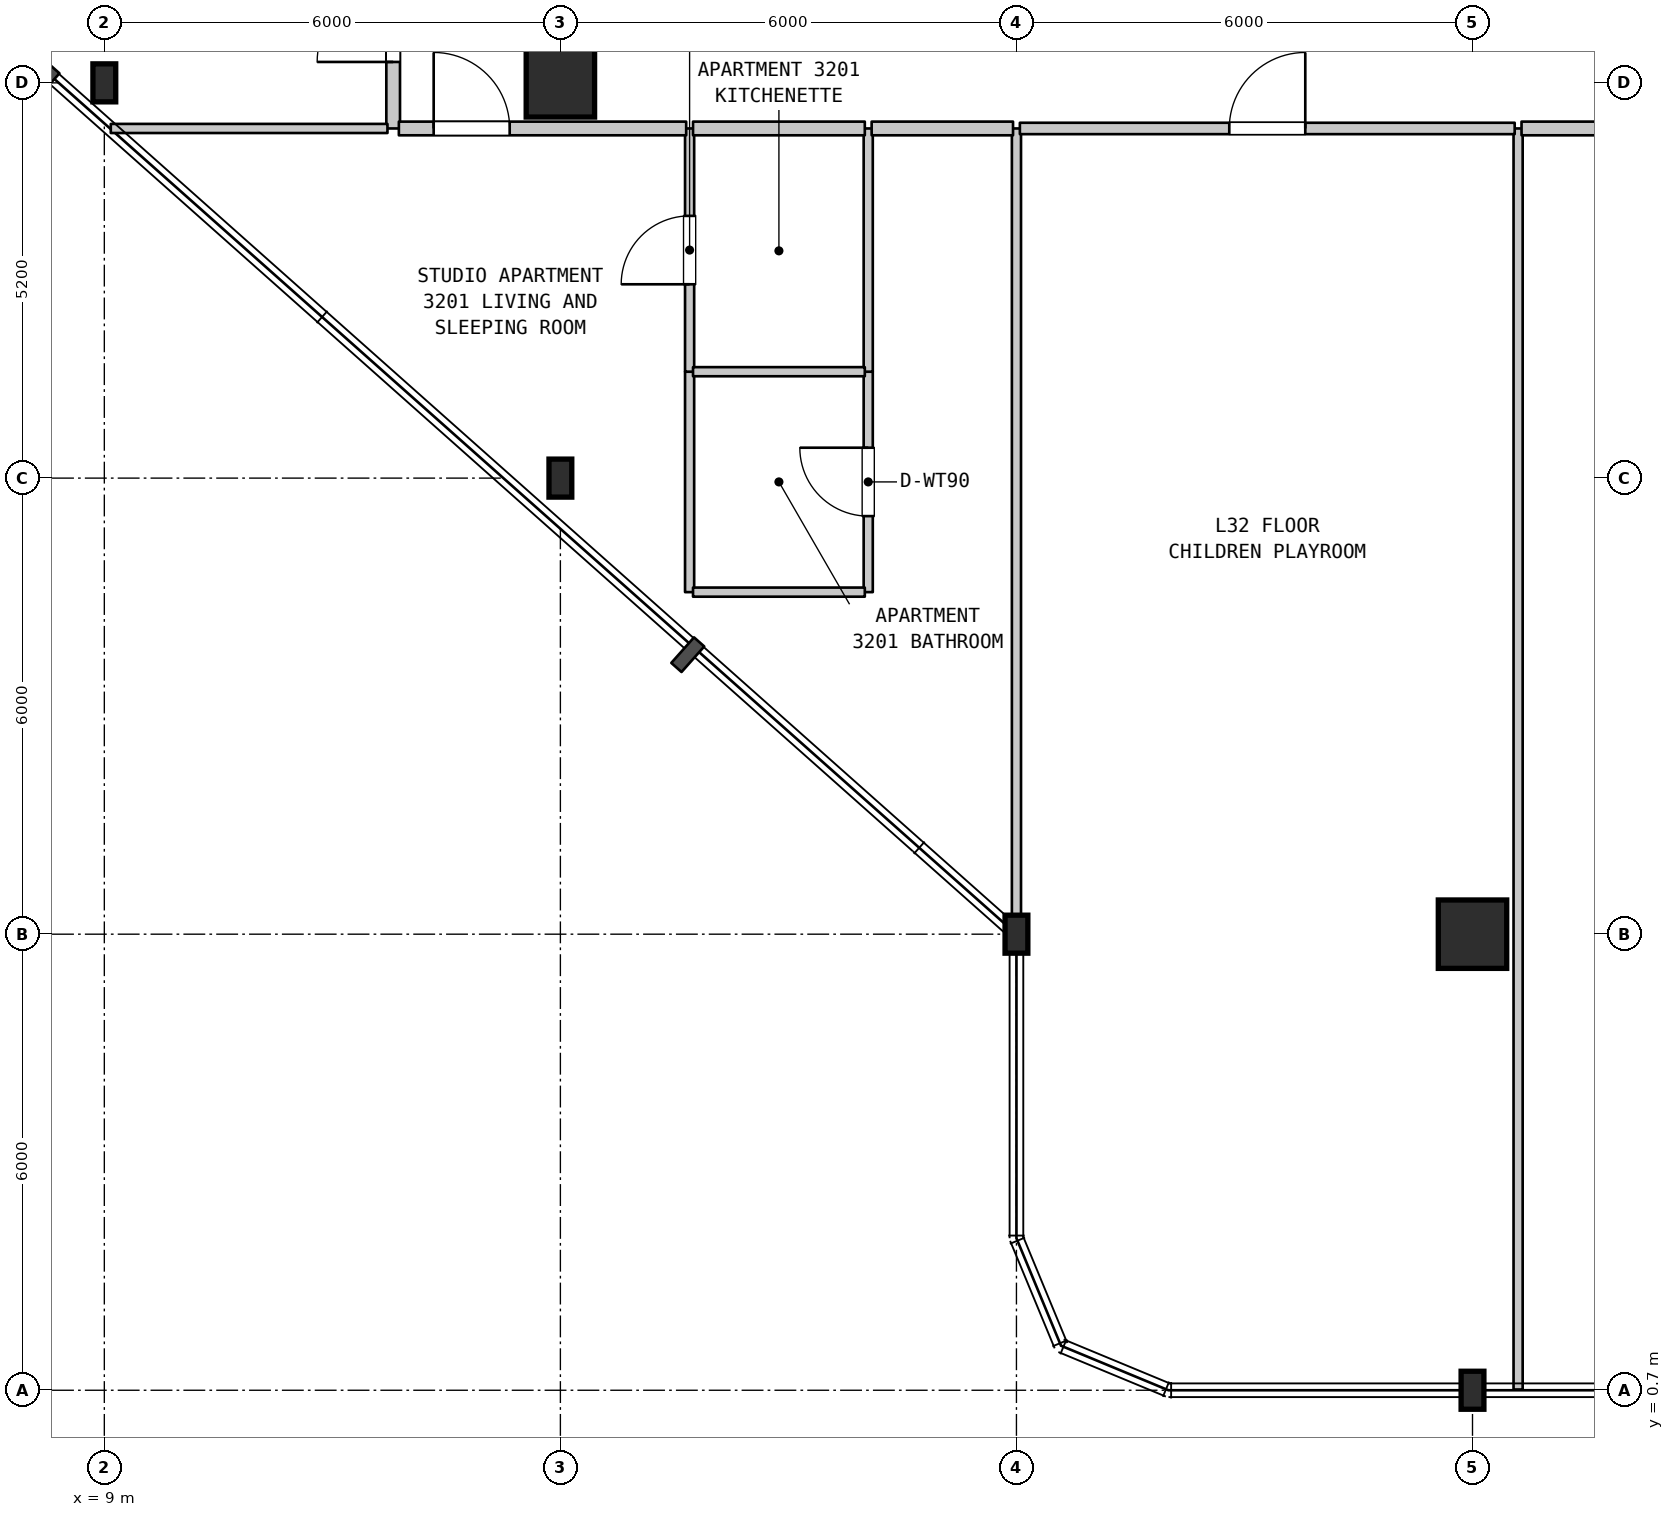
"""IFC4 building model, lengths in metres.
Left out: names, types, materials, properties, quantities, classifications, styles, units other than length and angle.
Written with IfcOpenShell. Run it as: python <this file> out.ifc"""

import sys

from ifc_helpers import new_model, si_unit, direction, frame, frame_2d, origin, origin_2d, place, context, subcontext, project, spatial, rectangle, i_section, extrude, element, fill, save


model = new_model("IFC4")
c1 = context("Model", 3, precision=1e-05, world=origin(), true_north=direction((0.0, 1.0)))
c2 = subcontext(c1, "Body", "Model", "MODEL_VIEW")
j1 = project(units=[si_unit("LENGTHUNIT", "METRE"), si_unit("PLANEANGLEUNIT", "RADIAN")], contexts=[c1])
p1 = place(None, origin())
s1 = spatial("IfcSite", under=j1, at=p1, CompositionType="ELEMENT")
p2 = place(p1, origin())
s2 = spatial("IfcBuilding", under=s1, at=p2, CompositionType="ELEMENT")
p3 = place(p2, frame((0.0, 0.0, 133.5)))
s3 = spatial("IfcBuildingStorey", under=s2, at=p3, CompositionType="ELEMENT", Elevation=133.5)
for number, where, z_axis, x_axis in (
    (1, (9.0, 17.9, 0.0), (0.0, 0.0, 1.0), (1.0, 0.0, 0.0)),
    (2, (15.0, 12.7, 0.0), (0.0, 0.0, 1.0), (1.0, 0.0, 0.0)),
):
    element("IfcColumn", number, at=place(p3, frame(where, z_axis=z_axis, x_axis=x_axis)), inside=s3, PredefinedType="COLUMN", context=c2, shape_type="SweptSolid", body=[
        extrude(i_section(OverallWidth=0.3, OverallDepth=0.5, WebThickness=0.014, FlangeThickness=0.028, FilletRadius=0.027, at=origin_2d()), origin(), (0.0, 0.0, 1.0), 3.7),
    ])
p4 = place(p3, frame((15.0, 17.9, 0.0), z_axis=(0.0, 0.0, 1.0), x_axis=(1.0, 0.0, 0.0)))
e3 = element("IfcColumn", 3, at=p4, inside=s3, PredefinedType="COLUMN", context=c2, shape_type="SweptSolid", body=[
    extrude(rectangle(XDim=0.9, YDim=0.9, at=origin_2d()), origin(), (0.0, 0.0, 1.0), 3.7),
])
for number, where, z_axis, x_axis in (
    (4, (21.0, 6.7, 0.0), (0.0, 0.0, 1.0), (1.0, 0.0, 0.0)),
    (5, (27.0, 0.7, 0.0), (0.0, 0.0, 1.0), (1.0, 0.0, 0.0)),
):
    element("IfcColumn", number, at=place(p3, frame(where, z_axis=z_axis, x_axis=x_axis)), inside=s3, PredefinedType="COLUMN", context=c2, shape_type="SweptSolid", body=[
        extrude(i_section(OverallWidth=0.3, OverallDepth=0.5, WebThickness=0.014, FlangeThickness=0.028, FilletRadius=0.027, at=origin_2d()), origin(), (0.0, 0.0, 1.0), 3.7),
    ])
p5 = place(p3, frame((27.0, 6.7, 0.0), z_axis=(0.0, 0.0, 1.0), x_axis=(1.0, 0.0, 0.0)))
e6 = element("IfcColumn", 6, at=p5, inside=s3, PredefinedType="COLUMN", context=c2, shape_type="SweptSolid", body=[
    extrude(rectangle(XDim=0.9, YDim=0.9, at=origin_2d()), origin(), (0.0, 0.0, 1.0), 3.7),
])
p6 = place(p3, frame((12.8, 17.3, 0.0), z_axis=(0.0, 0.0, 1.0), x_axis=(0.0, 1.0, 0.0)))
e7 = element("IfcWall", 7, at=p6, inside=s3, PredefinedType="STANDARD", context=c2, shape_type="SweptSolid", body=[
    extrude(rectangle(XDim=2.75, YDim=0.18, at=frame_2d((1.375, 0.0))), origin(), (0.0, 0.0, 1.0), 3.385),
])
p7 = place(p6, frame((0.875, 0.0, 0.0)))
e8 = element("IfcOpeningElement", 8, at=p7, cuts=e7, PredefinedType="OPENING", context=c2, shape_type="SweptSolid", body=[
    extrude(rectangle(XDim=1.0, YDim=2.15, at=frame_2d((0.5, 1.075))), frame((0.0, 0.1, 0.0), z_axis=(0.0, -1.0, 0.0), x_axis=(1.0, 0.0, 0.0)), (0.0, 0.0, 1.0), 0.2),
])
p8 = place(p3, frame((16.7, 11.2, 0.0), z_axis=(0.0, 0.0, 1.0), x_axis=(0.0, 1.0, 0.0)))
e9 = element("IfcWall", 9, at=p8, inside=s3, PredefinedType="PARTITIONING", context=c2, shape_type="SweptSolid", body=[
    extrude(rectangle(XDim=2.9, YDim=0.12, at=frame_2d((1.45, 0.0))), origin(), (0.0, 0.0, 1.0), 3.385),
])
p9 = place(p3, frame((16.7, 14.1, 0.0), z_axis=(0.0, 0.0, 1.0), x_axis=(0.0, 1.0, 0.0)))
e10 = element("IfcWall", 10, at=p9, inside=s3, PredefinedType="PARTITIONING", context=c2, shape_type="SweptSolid", body=[
    extrude(rectangle(XDim=3.2, YDim=0.12, at=frame_2d((1.6, 0.0))), origin(), (0.0, 0.0, 1.0), 3.385),
])
p10 = place(p9, frame((1.15, 0.0, 0.0)))
e11 = element("IfcOpeningElement", 11, at=p10, cuts=e10, PredefinedType="OPENING", context=c2, shape_type="SweptSolid", body=[
    extrude(rectangle(XDim=0.9, YDim=2.15, at=frame_2d((0.45, 1.075))), frame((0.0, 0.07, 0.0), z_axis=(0.0, -1.0, 0.0), x_axis=(1.0, 0.0, 0.0)), (0.0, 0.0, 1.0), 0.14),
])
p11 = place(p3, frame((19.05, 11.2, 0.0), z_axis=(0.0, 0.0, 1.0), x_axis=(0.0, 1.0, 0.0)))
e12 = element("IfcWall", 12, at=p11, inside=s3, PredefinedType="PARTITIONING", context=c2, shape_type="SweptSolid", body=[
    extrude(rectangle(XDim=2.9, YDim=0.12, at=frame_2d((1.45, 0.0))), origin(), (0.0, 0.0, 1.0), 3.385),
])
p12 = place(p11, frame((1.0, 0.0, 0.0)))
e13 = element("IfcOpeningElement", 13, at=p12, cuts=e12, PredefinedType="OPENING", context=c2, shape_type="SweptSolid", body=[
    extrude(rectangle(XDim=0.9, YDim=2.1, at=frame_2d((0.45, 1.05))), frame((0.0, 0.07, 0.0), z_axis=(0.0, -1.0, 0.0), x_axis=(1.0, 0.0, 0.0)), (0.0, 0.0, 1.0), 0.14),
])
p13 = place(p3, frame((19.05, 14.1, 0.0), z_axis=(0.0, 0.0, 1.0), x_axis=(0.0, 1.0, 0.0)))
e14 = element("IfcWall", 14, at=p13, inside=s3, PredefinedType="PARTITIONING", context=c2, shape_type="SweptSolid", body=[
    extrude(rectangle(XDim=3.2, YDim=0.12, at=frame_2d((1.6, 0.0))), origin(), (0.0, 0.0, 1.0), 3.385),
])
p14 = place(p3, frame((21.0, 6.71, 0.0), z_axis=(0.0, 0.0, 1.0), x_axis=(0.0, 1.0, 0.0)))
e15 = element("IfcWall", 15, at=p14, inside=s3, PredefinedType="PARTITIONING", context=c2, shape_type="SweptSolid", body=[
    extrude(rectangle(XDim=10.59, YDim=0.12, at=frame_2d((5.295, 0.0))), origin(), (0.0, 0.0, 1.0), 3.385),
])
p15 = place(p3, frame((27.6, 0.71, 0.0), z_axis=(0.0, 0.0, 1.0), x_axis=(0.0, 1.0, 0.0)))
e16 = element("IfcWall", 16, at=p15, inside=s3, PredefinedType="PARTITIONING", context=c2, shape_type="SweptSolid", body=[
    extrude(rectangle(XDim=16.59, YDim=0.12, at=frame_2d((8.295, 0.0))), origin(), (0.0, 0.0, 1.0), 3.385),
])
for number, where, z_axis, x_axis in (
    (17, (16.745, 11.2, 0.0), (0.0, 0.0, 1.0), (1.0, 0.0, 0.0)),
    (18, (16.745, 14.1, 0.0), (0.0, 0.0, 1.0), (1.0, 0.0, 0.0)),
):
    element("IfcWall", number, at=place(p3, frame(where, z_axis=z_axis, x_axis=x_axis)), inside=s3, PredefinedType="PARTITIONING", context=c2, shape_type="SweptSolid", body=[
        extrude(rectangle(XDim=2.26, YDim=0.12, at=frame_2d((1.13, 0.0))), origin(), (0.0, 0.0, 1.0), 3.385),
    ])
p16 = place(p3, frame((9.085, 17.3, 0.0), z_axis=(0.0, 0.0, 1.0), x_axis=(1.0, 0.0, 0.0)))
e19 = element("IfcWall", 19, at=p16, inside=s3, PredefinedType="PARTITIONING", context=c2, shape_type="SweptSolid", body=[
    extrude(rectangle(XDim=3.64, YDim=0.12, at=frame_2d((1.82, 0.0))), origin(), (0.0, 0.0, 1.0), 3.385),
])
p17 = place(p3, frame((12.875, 17.3, 0.0), z_axis=(0.0, 0.0, 1.0), x_axis=(1.0, 0.0, 0.0)))
e20 = element("IfcWall", 20, at=p17, inside=s3, PredefinedType="STANDARD", context=c2, shape_type="SweptSolid", body=[
    extrude(rectangle(XDim=3.78, YDim=0.18, at=frame_2d((1.89, 0.0))), origin(), (0.0, 0.0, 1.0), 3.385),
])
p18 = place(p17, frame((0.458, 0.0, 0.0)))
e21 = element("IfcOpeningElement", 21, at=p18, cuts=e20, PredefinedType="OPENING", context=c2, shape_type="SweptSolid", body=[
    extrude(rectangle(XDim=1.0, YDim=2.15, at=frame_2d((0.5, 1.075))), frame((0.0, 0.1, 0.0), z_axis=(0.0, -1.0, 0.0), x_axis=(1.0, 0.0, 0.0)), (0.0, 0.0, 1.0), 0.2),
])
p19 = place(p3, frame((16.745, 17.3, 0.0), z_axis=(0.0, 0.0, 1.0), x_axis=(1.0, 0.0, 0.0)))
e22 = element("IfcWall", 22, at=p19, inside=s3, PredefinedType="STANDARD", context=c2, shape_type="SweptSolid", body=[
    extrude(rectangle(XDim=2.26, YDim=0.18, at=frame_2d((1.13, 0.0))), origin(), (0.0, 0.0, 1.0), 3.385),
])
p20 = place(p3, frame((19.095, 17.3, 0.0), z_axis=(0.0, 0.0, 1.0), x_axis=(1.0, 0.0, 0.0)))
e23 = element("IfcWall", 23, at=p20, inside=s3, PredefinedType="STANDARD", context=c2, shape_type="SweptSolid", body=[
    extrude(rectangle(XDim=1.86, YDim=0.18, at=frame_2d((0.93, 0.0))), origin(), (0.0, 0.0, 1.0), 3.385),
])
p21 = place(p3, frame((21.045, 17.3, 0.0), z_axis=(0.0, 0.0, 1.0), x_axis=(1.0, 0.0, 0.0)))
e24 = element("IfcWall", 24, at=p21, inside=s3, PredefinedType="STANDARD", context=c2, shape_type="SweptSolid", body=[
    extrude(rectangle(XDim=6.51, YDim=0.15, at=frame_2d((3.255, 0.0))), origin(), (0.0, 0.0, 1.0), 3.385),
])
p22 = place(p21, frame((2.755, 0.0, 0.0)))
e25 = element("IfcOpeningElement", 25, at=p22, cuts=e24, PredefinedType="OPENING", context=c2, shape_type="SweptSolid", body=[
    extrude(rectangle(XDim=1.0, YDim=2.15, at=frame_2d((0.5, 1.075))), frame((0.0, 0.085, 0.0), z_axis=(0.0, -1.0, 0.0), x_axis=(1.0, 0.0, 0.0)), (0.0, 0.0, 1.0), 0.17),
])
p23 = place(p3, frame((27.645, 17.3, 0.0), z_axis=(0.0, 0.0, 1.0), x_axis=(1.0, 0.0, 0.0)))
e26 = element("IfcWall", 26, at=p23, inside=s3, PredefinedType="STANDARD", context=c2, shape_type="SweptSolid", body=[
    extrude(rectangle(XDim=4.45, YDim=0.18, at=frame_2d((2.225, 0.0))), origin(), (0.0, 0.0, 1.0), 3.385),
])
p24 = place(p23, frame((1.653, 0.0, 0.0)))
e27 = element("IfcOpeningElement", 27, at=p24, cuts=e26, PredefinedType="OPENING", context=c2, shape_type="SweptSolid", body=[
    extrude(rectangle(XDim=1.0, YDim=2.15, at=frame_2d((0.5, 1.075))), frame((0.0, 0.1, 0.0), z_axis=(0.0, -1.0, 0.0), x_axis=(1.0, 0.0, 0.0)), (0.0, 0.0, 1.0), 0.2),
])
p25 = place(p7, origin())
e28 = element("IfcDoor", 28, at=p25, inside=s3, OperationType="SINGLE_SWING_LEFT", PredefinedType="DOOR", context=c2, shape_type="SweptSolid", body=[
    extrude(rectangle(XDim=1.0, YDim=2.15, at=frame_2d((0.5, 1.075))), frame((0.0, 0.025, 0.0), z_axis=(0.0, -1.0, 0.0), x_axis=(1.0, 0.0, 0.0)), (0.0, 0.0, 1.0), 0.05),
])
fill(e8, e28)
p26 = place(p10, origin())
e29 = element("IfcDoor", 29, at=p26, inside=s3, OperationType="SINGLE_SWING_LEFT", PredefinedType="DOOR", context=c2, shape_type="SweptSolid", body=[
    extrude(rectangle(XDim=0.9, YDim=2.15, at=frame_2d((0.45, 1.075))), frame((0.0, 0.025, 0.0), z_axis=(0.0, -1.0, 0.0), x_axis=(1.0, 0.0, 0.0)), (0.0, 0.0, 1.0), 0.05),
])
fill(e11, e29)
p27 = place(p12, origin())
e30 = element("IfcDoor", 30, at=p27, inside=s3, OperationType="SINGLE_SWING_RIGHT", PredefinedType="DOOR", context=c2, shape_type="SweptSolid", body=[
    extrude(rectangle(XDim=0.9, YDim=2.1, at=frame_2d((0.45, 1.05))), frame((0.0, 0.025, 0.0), z_axis=(0.0, -1.0, 0.0), x_axis=(1.0, 0.0, 0.0)), (0.0, 0.0, 1.0), 0.05),
])
fill(e13, e30)
p28 = place(p18, origin())
e31 = element("IfcDoor", 31, at=p28, inside=s3, OperationType="SINGLE_SWING_LEFT", PredefinedType="DOOR", context=c2, shape_type="SweptSolid", body=[
    extrude(rectangle(XDim=1.0, YDim=2.15, at=frame_2d((0.5, 1.075))), frame((0.0, 0.025, 0.0), z_axis=(0.0, -1.0, 0.0), x_axis=(1.0, 0.0, 0.0)), (0.0, 0.0, 1.0), 0.05),
])
fill(e21, e31)
p29 = place(p22, origin())
e32 = element("IfcDoor", 32, at=p29, inside=s3, OperationType="SINGLE_SWING_RIGHT", PredefinedType="DOOR", context=c2, shape_type="SweptSolid", body=[
    extrude(rectangle(XDim=1.0, YDim=2.15, at=frame_2d((0.5, 1.075))), frame((0.0, 0.025, 0.0), z_axis=(0.0, -1.0, 0.0), x_axis=(1.0, 0.0, 0.0)), (0.0, 0.0, 1.0), 0.05),
])
fill(e25, e32)
save(model, sys.argv[1])
